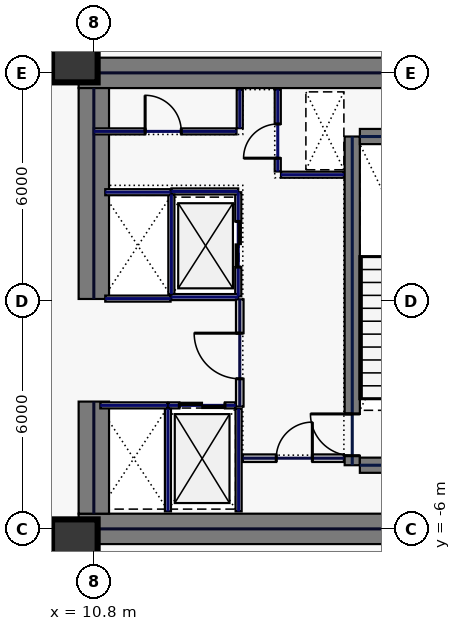
"""IFC4 building model, lengths in metres.
Left out: names, types, materials, properties, quantities, classifications, styles, units other than length and angle.
Written with IfcOpenShell. Run it as: python <this file> out.ifc"""

import sys

from ifc_helpers import new_model, si_unit, direction, frame, frame_2d, origin, origin_2d, place, context, subcontext, project, spatial, rectangle, hollow_rectangle, extrude, element, fill, save


model = new_model("IFC4")
c1 = context("Model", 3, precision=1e-05, world=origin(), true_north=direction((0.0, 1.0)))
c2 = subcontext(c1, "Body", "Model", "MODEL_VIEW")
j1 = project(units=[si_unit("LENGTHUNIT", "METRE"), si_unit("PLANEANGLEUNIT", "RADIAN")], contexts=[c1])
p1 = place(None, origin())
s1 = spatial("IfcSite", under=j1, at=p1, CompositionType="ELEMENT")
p2 = place(p1, origin())
s2 = spatial("IfcBuilding", under=s1, at=p2, CompositionType="ELEMENT")
p3 = place(p2, frame((0.0, 0.0, 75.4)))
s3 = spatial("IfcBuildingStorey", under=s2, at=p3, CompositionType="ELEMENT", Elevation=75.4)
for number, where, z_axis, x_axis in (
    (1, (10.4, 6.0, 0.0), (0.0, 0.0, 1.0), (1.0, 0.0, 0.0)),
    (2, (10.4, -6.0, 0.0), (0.0, 0.0, 1.0), (1.0, 0.0, 0.0)),
):
    element("IfcWall", number, at=place(p3, frame(where, z_axis=z_axis, x_axis=x_axis)), inside=s3, PredefinedType="SHEAR", context=c2, shape_type="SweptSolid", body=[
        extrude(rectangle(XDim=11.6, YDim=0.8, at=frame_2d((5.8, 0.0))), origin(), (0.0, 0.0, 1.0), 3.74),
    ])
p4 = place(p3, frame((10.8, -5.6, 0.0), z_axis=(0.0, 0.0, 1.0), x_axis=(0.0, 1.0, 0.0)))
e3 = element("IfcWall", 3, at=p4, inside=s3, PredefinedType="SHEAR", context=c2, shape_type="SweptSolid", body=[
    extrude(rectangle(XDim=2.95, YDim=0.8, at=frame_2d((1.475, 0.0))), origin(), (0.0, 0.0, 1.0), 3.74),
])
p5 = place(p3, frame((10.8, 0.05, 0.0), z_axis=(0.0, 0.0, 1.0), x_axis=(0.0, 1.0, 0.0)))
e4 = element("IfcWall", 4, at=p5, inside=s3, PredefinedType="SHEAR", context=c2, shape_type="SweptSolid", body=[
    extrude(rectangle(XDim=5.55, YDim=0.8, at=frame_2d((2.775, 0.0))), origin(), (0.0, 0.0, 1.0), 3.74),
])
p6 = place(p3, frame((17.6, -4.325, 0.0), z_axis=(0.0, 0.0, 1.0), x_axis=(0.0, 1.0, 0.0)))
e5 = element("IfcWall", 5, at=p6, inside=s3, PredefinedType="SHEAR", context=c2, shape_type="SweptSolid", body=[
    extrude(rectangle(XDim=8.65, YDim=0.4, at=frame_2d((4.325, 0.0))), origin(), (0.0, 0.0, 1.0), 3.74),
])
p7 = place(p6, frame((0.25, 0.0, 0.0)))
e6 = element("IfcOpeningElement", 6, at=p7, cuts=e5, PredefinedType="OPENING", context=c2, shape_type="SweptSolid", body=[
    extrude(rectangle(XDim=1.1, YDim=2.2, at=frame_2d((0.55, 1.1))), frame((0.0, 0.21, 0.0), z_axis=(0.0, -1.0, 0.0), x_axis=(1.0, 0.0, 0.0)), (0.0, 0.0, 1.0), 0.42),
])
for number, where, z_axis, x_axis in (
    (7, (17.8, -4.325, 0.0), (0.0, 0.0, 1.0), (1.0, 0.0, 0.0)),
    (8, (17.8, 4.325, 0.0), (0.0, 0.0, 1.0), (1.0, 0.0, 0.0)),
):
    element("IfcWall", number, at=place(p3, frame(where, z_axis=z_axis, x_axis=x_axis)), inside=s3, PredefinedType="SHEAR", context=c2, shape_type="SweptSolid", body=[
        extrude(rectangle(XDim=3.4, YDim=0.4, at=frame_2d((1.7, 0.0))), origin(), (0.0, 0.0, 1.0), 3.74),
    ])
for number, where, z_axis, x_axis in (
    (9, (10.3, -6.35, 0.0), (0.0, 0.0, 1.0), (1.0, 0.0, 0.0)),
    (10, (10.3, 6.35, 0.0), (0.0, 0.0, 1.0), (1.0, 0.0, 0.0)),
):
    element("IfcColumn", number, at=place(p3, frame(where, z_axis=z_axis, x_axis=x_axis)), inside=s3, PredefinedType="COLUMN", context=c2, shape_type="SweptSolid", body=[
        extrude(hollow_rectangle(XDim=1.2, YDim=1.2, WallThickness=0.05, at=origin_2d()), origin(), (0.0, 0.0, 1.0), 3.74),
    ])
p8 = place(p3, frame((14.6, 0.12, 0.0), z_axis=(0.0, 0.0, 1.0), x_axis=(0.0, 1.0, 0.0)))
e11 = element("IfcWall", 11, at=p8, inside=s3, PredefinedType="PARTITIONING", context=c2, shape_type="SweptSolid", body=[
    extrude(rectangle(XDim=2.74, YDim=0.16, at=frame_2d((1.37, 0.0))), origin(), (0.0, 0.0, 1.0), 3.74),
])
p9 = place(p8, frame((0.77, 0.0, 0.0)))
e12 = element("IfcOpeningElement", 12, at=p9, cuts=e11, PredefinedType="OPENING", context=c2, shape_type="SweptSolid", body=[
    extrude(rectangle(XDim=1.2, YDim=2.2, at=frame_2d((0.6, 1.1))), frame((0.0, 0.09, 0.0), z_axis=(0.0, -1.0, 0.0), x_axis=(1.0, 0.0, 0.0)), (0.0, 0.0, 1.0), 0.18),
])
for number, where, z_axis, x_axis in (
    (13, (12.84, 0.1, 0.0), (0.0, 0.0, 1.0), (1.0, 0.0, 0.0)),
    (14, (12.84, 2.88, 0.0), (0.0, 0.0, 1.0), (1.0, 0.0, 0.0)),
):
    element("IfcWall", number, at=place(p3, frame(where, z_axis=z_axis, x_axis=x_axis)), inside=s3, PredefinedType="PARTITIONING", context=c2, shape_type="SweptSolid", body=[
        extrude(rectangle(XDim=1.76, YDim=0.16, at=frame_2d((0.88, 0.0))), origin(), (0.0, 0.0, 1.0), 3.74),
    ])
p10 = place(p3, frame((12.84, 0.18, 0.0), z_axis=(0.0, 0.0, 1.0), x_axis=(0.0, 1.0, 0.0)))
e15 = element("IfcWall", 15, at=p10, inside=s3, PredefinedType="PARTITIONING", context=c2, shape_type="SweptSolid", body=[
    extrude(rectangle(XDim=2.62, YDim=0.16, at=frame_2d((1.31, 0.0))), origin(), (0.0, 0.0, 1.0), 3.74),
])
p11 = place(p3, frame((12.77, -2.75, 0.0), z_axis=(0.0, 0.0, 1.0), x_axis=(1.0, 0.0, 0.0)))
e16 = element("IfcWall", 16, at=p11, inside=s3, PredefinedType="PARTITIONING", context=c2, shape_type="SweptSolid", body=[
    extrude(rectangle(XDim=1.76, YDim=0.16, at=frame_2d((0.88, 0.0))), origin(), (0.0, 0.0, 1.0), 3.74),
])
p12 = place(p11, frame((0.28, 0.0, 0.0)))
e17 = element("IfcOpeningElement", 17, at=p12, cuts=e16, PredefinedType="OPENING", context=c2, shape_type="SweptSolid", body=[
    extrude(rectangle(XDim=1.2, YDim=2.2, at=frame_2d((0.6, 1.1))), frame((0.0, 0.09, 0.0), z_axis=(0.0, -1.0, 0.0), x_axis=(1.0, 0.0, 0.0)), (0.0, 0.0, 1.0), 0.18),
])
for number, where, z_axis, x_axis in (
    (18, (12.75, -5.54, 0.0), (0.0, 0.0, 1.0), (0.0, 1.0, 0.0)),
    (19, (14.61, -5.54, 0.0), (0.0, 0.0, 1.0), (0.0, 1.0, 0.0)),
):
    element("IfcWall", number, at=place(p3, frame(where, z_axis=z_axis, x_axis=x_axis)), inside=s3, PredefinedType="PARTITIONING", context=c2, shape_type="SweptSolid", body=[
        extrude(rectangle(XDim=2.7, YDim=0.16, at=frame_2d((1.35, 0.0))), origin(), (0.0, 0.0, 1.0), 3.74),
    ])
p13 = place(p3, frame((10.97, -2.75, 0.0), z_axis=(0.0, 0.0, 1.0), x_axis=(1.0, 0.0, 0.0)))
e20 = element("IfcWall", 20, at=p13, inside=s3, PredefinedType="PARTITIONING", context=c2, shape_type="SweptSolid", body=[
    extrude(rectangle(XDim=1.76, YDim=0.16, at=frame_2d((0.88, 0.0))), origin(), (0.0, 0.0, 1.0), 3.74),
])
for number, where, z_axis, x_axis in (
    (21, (11.1, 0.06, 0.0), (0.0, 0.0, 1.0), (1.0, 0.0, 0.0)),
    (22, (11.1, 2.86, 0.0), (0.0, 0.0, 1.0), (1.0, 0.0, 0.0)),
):
    element("IfcWall", number, at=place(p3, frame(where, z_axis=z_axis, x_axis=x_axis)), inside=s3, PredefinedType="PARTITIONING", context=c2, shape_type="SweptSolid", body=[
        extrude(rectangle(XDim=1.72, YDim=0.16, at=frame_2d((0.86, 0.0))), origin(), (0.0, 0.0, 1.0), 3.74),
    ])
p14 = place(p3, frame((15.64, 3.405, 0.0), z_axis=(0.0, 0.0, 1.0), x_axis=(0.0, 1.0, 0.0)))
e23 = element("IfcWall", 23, at=p14, inside=s3, PredefinedType="PARTITIONING", context=c2, shape_type="SweptSolid", body=[
    extrude(rectangle(XDim=2.155, YDim=0.16, at=frame_2d((1.078, 0.0))), origin(), (0.0, 0.0, 1.0), 3.74),
])
p15 = place(p14, frame((0.35, 0.0, 0.0)))
e24 = element("IfcOpeningElement", 24, at=p15, cuts=e23, PredefinedType="OPENING", context=c2, shape_type="SweptSolid", body=[
    extrude(rectangle(XDim=0.9, YDim=2.2, at=frame_2d((0.45, 1.1))), frame((0.0, 0.09, 0.0), z_axis=(0.0, -1.0, 0.0), x_axis=(1.0, 0.0, 0.0)), (0.0, 0.0, 1.0), 0.18),
])
p16 = place(p3, frame((15.725, 3.32, 0.0), z_axis=(0.0, 0.0, 1.0), x_axis=(1.0, 0.0, 0.0)))
e25 = element("IfcWall", 25, at=p16, inside=s3, PredefinedType="PARTITIONING", context=c2, shape_type="SweptSolid", body=[
    extrude(rectangle(XDim=1.655, YDim=0.16, at=frame_2d((0.827, 0.0))), origin(), (0.0, 0.0, 1.0), 3.74),
])
p17 = place(p3, frame((14.72, -4.14, 0.0), z_axis=(0.0, 0.0, 1.0), x_axis=(1.0, 0.0, 0.0)))
e26 = element("IfcWall", 26, at=p17, inside=s3, PredefinedType="SOLIDWALL", context=c2, shape_type="SweptSolid", body=[
    extrude(rectangle(XDim=2.66, YDim=0.2, at=frame_2d((1.33, 0.0))), origin(), (0.0, 0.0, 1.0), 3.74),
])
p18 = place(p17, frame((0.88, 0.0, 0.0)))
e27 = element("IfcOpeningElement", 27, at=p18, cuts=e26, PredefinedType="OPENING", context=c2, shape_type="SweptSolid", body=[
    extrude(rectangle(XDim=0.95, YDim=2.2, at=frame_2d((0.475, 1.1))), frame((0.0, 0.11, 0.0), z_axis=(0.0, -1.0, 0.0), x_axis=(1.0, 0.0, 0.0)), (0.0, 0.0, 1.0), 0.22),
])
p19 = place(p3, frame((10.8, 4.46, 0.0), z_axis=(0.0, 0.0, 1.0), x_axis=(1.0, 0.0, 0.0)))
e28 = element("IfcWall", 28, at=p19, inside=s3, PredefinedType="PARTITIONING", context=c2, shape_type="SweptSolid", body=[
    extrude(rectangle(XDim=3.755, YDim=0.16, at=frame_2d((1.877, 0.0))), origin(), (0.0, 0.0, 1.0), 3.74),
])
p20 = place(p19, frame((1.35, 0.0, 0.0)))
e29 = element("IfcOpeningElement", 29, at=p20, cuts=e28, PredefinedType="OPENING", context=c2, shape_type="SweptSolid", body=[
    extrude(rectangle(XDim=0.95, YDim=2.2, at=frame_2d((0.475, 1.1))), frame((0.0, 0.09, 0.0), z_axis=(0.0, -1.0, 0.0), x_axis=(1.0, 0.0, 0.0)), (0.0, 0.0, 1.0), 0.18),
])
p21 = place(p3, frame((14.64, 4.545, 0.0), z_axis=(0.0, 0.0, 1.0), x_axis=(0.0, 1.0, 0.0)))
e30 = element("IfcWall", 30, at=p21, inside=s3, PredefinedType="PARTITIONING", context=c2, shape_type="SweptSolid", body=[
    extrude(rectangle(XDim=1.015, YDim=0.16, at=frame_2d((0.508, 0.0))), origin(), (0.0, 0.0, 1.0), 3.74),
])
p22 = place(p3, frame((14.64, -2.78, 0.0), z_axis=(0.0, 0.0, 1.0), x_axis=(0.0, 1.0, 0.0)))
e31 = element("IfcWall", 31, at=p22, inside=s3, PredefinedType="SOLIDWALL", context=c2, shape_type="SweptSolid", body=[
    extrude(rectangle(XDim=2.82, YDim=0.2, at=frame_2d((1.41, 0.0))), origin(), (0.0, 0.0, 1.0), 3.74),
])
p23 = place(p22, frame((0.73, 0.0, 0.0)))
e32 = element("IfcOpeningElement", 32, at=p23, cuts=e31, PredefinedType="OPENING", context=c2, shape_type="SweptSolid", body=[
    extrude(rectangle(XDim=1.2, YDim=2.2, at=frame_2d((0.6, 1.1))), frame((0.0, 0.11, 0.0), z_axis=(0.0, -1.0, 0.0), x_axis=(1.0, 0.0, 0.0)), (0.0, 0.0, 1.0), 0.22),
])
p24 = place(p3, frame((10.58, 7.885, 0.0), z_axis=(0.0, 0.0, 1.0), x_axis=(0.0, -1.0, 0.0)))
e33 = element("IfcWall", 33, at=p24, inside=s3, PredefinedType="PARTITIONING", context=c2, shape_type="SweptSolid", body=[
    extrude(rectangle(XDim=1.465, YDim=0.16, at=frame_2d((0.732, 0.0))), origin(), (0.0, 0.0, 1.0), 3.74),
])
p25 = place(p3, frame((10.58, -6.42, 0.0), z_axis=(0.0, 0.0, 1.0), x_axis=(0.0, -1.0, 0.0)))
e34 = element("IfcWall", 34, at=p25, inside=s3, PredefinedType="PARTITIONING", context=c2, shape_type="SweptSolid", body=[
    extrude(rectangle(XDim=1.365, YDim=0.16, at=frame_2d((0.683, 0.0))), origin(), (0.0, 0.0, 1.0), 3.74),
])
p26 = place(p7, origin())
e35 = element("IfcDoor", 35, at=p26, inside=s3, OperationType="SINGLE_SWING_RIGHT", PredefinedType="DOOR", context=c2, shape_type="SweptSolid", body=[
    extrude(rectangle(XDim=1.1, YDim=2.2, at=frame_2d((0.55, 1.1))), frame((0.0, 0.025, 0.0), z_axis=(0.0, -1.0, 0.0), x_axis=(1.0, 0.0, 0.0)), (0.0, 0.0, 1.0), 0.05),
])
fill(e6, e35)
p27 = place(p9, origin())
e36 = element("IfcDoor", 36, at=p27, inside=s3, OperationType="SLIDING_TO_LEFT", PredefinedType="DOOR", context=c2, shape_type="SweptSolid", body=[
    extrude(rectangle(XDim=1.2, YDim=2.2, at=frame_2d((0.6, 1.1))), frame((0.0, 0.025, 0.0), z_axis=(0.0, -1.0, 0.0), x_axis=(1.0, 0.0, 0.0)), (0.0, 0.0, 1.0), 0.05),
])
fill(e12, e36)
p28 = place(p12, origin())
e37 = element("IfcDoor", 37, at=p28, inside=s3, OperationType="SLIDING_TO_LEFT", PredefinedType="DOOR", context=c2, shape_type="SweptSolid", body=[
    extrude(rectangle(XDim=1.2, YDim=2.2, at=frame_2d((0.6, 1.1))), frame((0.0, 0.025, 0.0), z_axis=(0.0, -1.0, 0.0), x_axis=(1.0, 0.0, 0.0)), (0.0, 0.0, 1.0), 0.05),
])
fill(e17, e37)
p29 = place(p15, origin())
e38 = element("IfcDoor", 38, at=p29, inside=s3, OperationType="SINGLE_SWING_LEFT", PredefinedType="DOOR", context=c2, shape_type="SweptSolid", body=[
    extrude(rectangle(XDim=0.9, YDim=2.2, at=frame_2d((0.45, 1.1))), frame((0.0, 0.025, 0.0), z_axis=(0.0, -1.0, 0.0), x_axis=(1.0, 0.0, 0.0)), (0.0, 0.0, 1.0), 0.05),
])
fill(e24, e38)
p30 = place(p18, origin())
e39 = element("IfcDoor", 39, at=p30, inside=s3, OperationType="SINGLE_SWING_RIGHT", PredefinedType="DOOR", context=c2, shape_type="SweptSolid", body=[
    extrude(rectangle(XDim=0.95, YDim=2.2, at=frame_2d((0.475, 1.1))), frame((0.0, 0.025, 0.0), z_axis=(0.0, -1.0, 0.0), x_axis=(1.0, 0.0, 0.0)), (0.0, 0.0, 1.0), 0.05),
])
fill(e27, e39)
p31 = place(p20, origin())
e40 = element("IfcDoor", 40, at=p31, inside=s3, OperationType="SINGLE_SWING_LEFT", PredefinedType="DOOR", context=c2, shape_type="SweptSolid", body=[
    extrude(rectangle(XDim=0.95, YDim=2.2, at=frame_2d((0.475, 1.1))), frame((0.0, 0.025, 0.0), z_axis=(0.0, -1.0, 0.0), x_axis=(1.0, 0.0, 0.0)), (0.0, 0.0, 1.0), 0.05),
])
fill(e29, e40)
p32 = place(p23, origin())
e41 = element("IfcDoor", 41, at=p32, inside=s3, OperationType="SINGLE_SWING_RIGHT", PredefinedType="DOOR", context=c2, shape_type="SweptSolid", body=[
    extrude(rectangle(XDim=1.2, YDim=2.2, at=frame_2d((0.6, 1.1))), frame((0.0, 0.025, 0.0), z_axis=(0.0, -1.0, 0.0), x_axis=(1.0, 0.0, 0.0)), (0.0, 0.0, 1.0), 0.05),
])
fill(e32, e41)
save(model, sys.argv[1])
